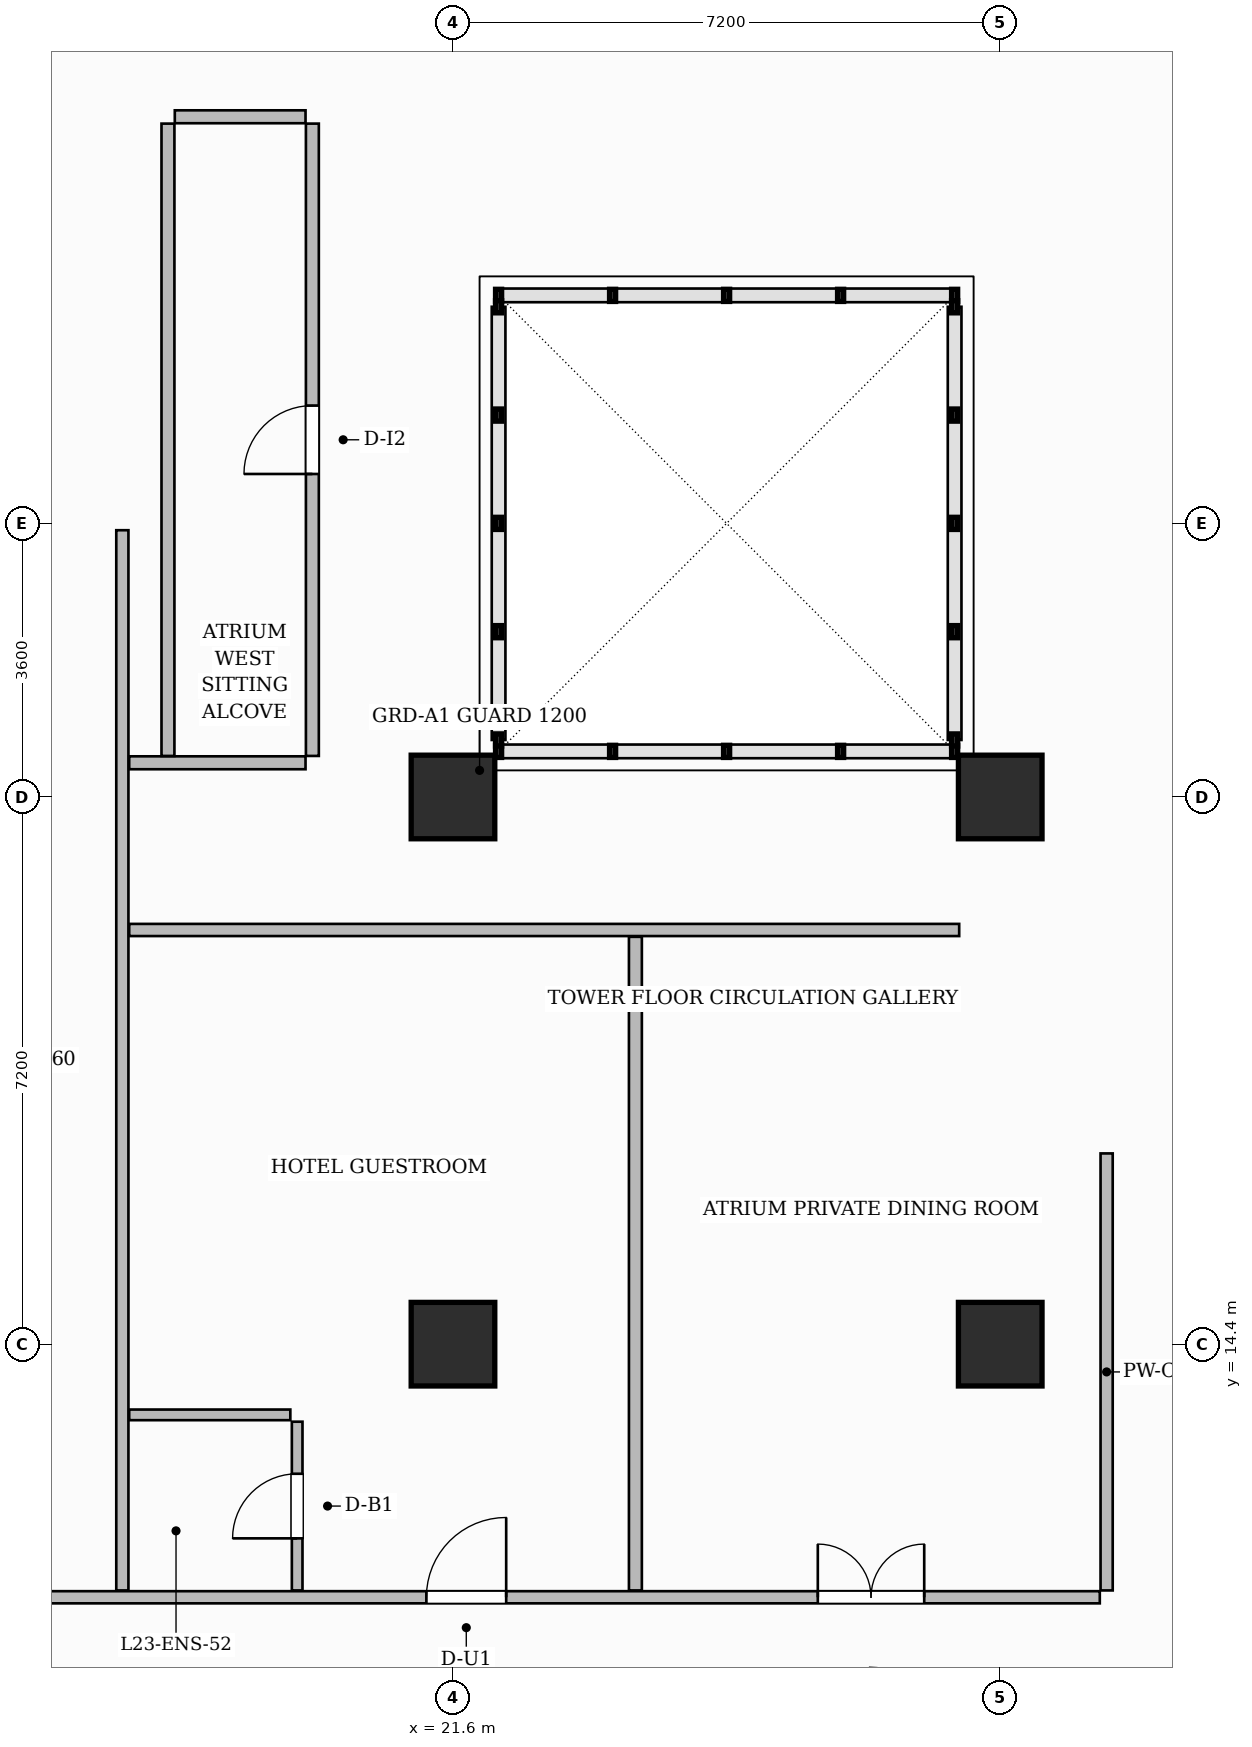
"""IFC4 building model, lengths in metres.
Left out: names, types, materials, properties, quantities, classifications, styles, units other than length and angle.
Written with IfcOpenShell. Run it as: python <this file> out.ifc"""

import sys

from ifc_helpers import new_model, si_unit, direction, frame, frame_2d, origin, origin_2d, place, context, subcontext, project, spatial, rectangle, extrude, source, transform, mapped, element, fill, save


model = new_model("IFC4")
c1 = context("Model", 3, precision=1e-05, world=origin(), true_north=direction((0.0, 1.0)))
c2 = subcontext(c1, "Body", "Model", "MODEL_VIEW")
j1 = project(units=[si_unit("LENGTHUNIT", "METRE"), si_unit("PLANEANGLEUNIT", "RADIAN")], contexts=[c1])
p1 = place(None, origin())
s1 = spatial("IfcSite", under=j1, at=p1, CompositionType="ELEMENT")
p2 = place(p1, origin())
s2 = spatial("IfcBuilding", under=s1, at=p2, CompositionType="ELEMENT")
p3 = place(p2, frame((0.0, 0.0, 95.3)))
s3 = spatial("IfcBuildingStorey", under=s2, at=p3, CompositionType="ELEMENT", Elevation=95.3)
m1 = source(origin(), c2, "Body", "SweptSolid", [
    extrude(rectangle(XDim=1.1, YDim=1.1, at=origin_2d()), origin(), (0.0, 0.0, 1.0), 3.7),
])
for number, where, z_axis, x_axis in (
    (1, (21.6, 14.4, 0.0), (0.0, 0.0, 1.0), (1.0, 0.0, 0.0)),
    (2, (21.6, 21.6, 0.0), (0.0, 0.0, 1.0), (1.0, 0.0, 0.0)),
    (3, (28.8, 14.4, 0.0), (0.0, 0.0, 1.0), (1.0, 0.0, 0.0)),
    (4, (28.8, 21.6, 0.0), (0.0, 0.0, 1.0), (1.0, 0.0, 0.0)),
):
    element("IfcColumn", number, at=place(p3, frame(where, z_axis=z_axis, x_axis=x_axis)), inside=s3, PredefinedType="COLUMN", context=c2, shape_type="MappedRepresentation", body=[
        mapped(m1, transform((0.0, 0.0, 0.0), scale=1.0)),
    ])
p4 = place(p3, frame((14.548, 11.07, 0.0), z_axis=(0.0, 0.0, 1.0), x_axis=(1.0, 0.0, 0.0)))
e5 = element("IfcWall", 5, at=p4, inside=s3, PredefinedType="PARTITIONING", context=c2, shape_type="SweptSolid", body=[
    extrude(rectangle(XDim=15.562, YDim=0.16, at=frame_2d((7.781, 0.0))), origin(), (0.0, 0.0, 1.0), 3.45),
])
p5 = place(p4, frame((6.702, 0.0, 0.0)))
e6 = element("IfcOpeningElement", 6, at=p5, cuts=e5, PredefinedType="OPENING", context=c2, shape_type="SweptSolid", body=[
    extrude(rectangle(XDim=1.05, YDim=2.25, at=frame_2d((0.525, 1.125))), frame((0.0, 0.09, 0.0), z_axis=(0.0, -1.0, 0.0), x_axis=(1.0, 0.0, 0.0)), (0.0, 0.0, 1.0), 0.18),
])
p6 = place(p4, frame((11.852, 0.0, 0.0)))
e7 = element("IfcOpeningElement", 7, at=p6, cuts=e5, PredefinedType="OPENING", context=c2, shape_type="SweptSolid", body=[
    extrude(rectangle(XDim=1.4, YDim=2.35, at=frame_2d((0.7, 1.175))), frame((0.0, 0.09, 0.0), z_axis=(0.0, -1.0, 0.0), x_axis=(1.0, 0.0, 0.0)), (0.0, 0.0, 1.0), 0.18),
])
p7 = place(p3, frame((30.2, 11.16, 0.0), z_axis=(0.0, 0.0, 1.0), x_axis=(0.0, 1.0, 0.0)))
e8 = element("IfcWall", 8, at=p7, inside=s3, PredefinedType="PARTITIONING", context=c2, shape_type="SweptSolid", body=[
    extrude(rectangle(XDim=5.75, YDim=0.16, at=frame_2d((2.875, 0.0))), origin(), (0.0, 0.0, 1.0), 3.45),
])
p8 = place(p3, frame((17.25, 11.16, 0.0), z_axis=(0.0, 0.0, 1.0), x_axis=(0.0, 1.0, 0.0)))
e9 = element("IfcWall", 9, at=p8, inside=s3, PredefinedType="PARTITIONING", context=c2, shape_type="SweptSolid", body=[
    extrude(rectangle(XDim=13.95, YDim=0.16, at=frame_2d((6.975, 0.0))), origin(), (0.0, 0.0, 1.0), 3.45),
])
p9 = place(p3, frame((17.34, 22.05, 0.0), z_axis=(0.0, 0.0, 1.0), x_axis=(1.0, 0.0, 0.0)))
e10 = element("IfcWall", 10, at=p9, inside=s3, PredefinedType="PARTITIONING", context=c2, shape_type="SweptSolid", body=[
    extrude(rectangle(XDim=2.32, YDim=0.17, at=frame_2d((1.16, 0.0))), origin(), (0.0, 0.0, 1.0), 3.45),
])
p10 = place(p3, frame((17.94, 30.55, 0.0), z_axis=(0.0, 0.0, 1.0), x_axis=(1.0, 0.0, 0.0)))
e11 = element("IfcWall", 11, at=p10, inside=s3, PredefinedType="PARTITIONING", context=c2, shape_type="SweptSolid", body=[
    extrude(rectangle(XDim=1.72, YDim=0.17, at=frame_2d((0.86, 0.0))), origin(), (0.0, 0.0, 1.0), 3.45),
])
p11 = place(p3, frame((17.85, 22.14, 0.0), z_axis=(0.0, 0.0, 1.0), x_axis=(0.0, 1.0, 0.0)))
e12 = element("IfcWall", 12, at=p11, inside=s3, PredefinedType="PARTITIONING", context=c2, shape_type="SweptSolid", body=[
    extrude(rectangle(XDim=8.32, YDim=0.17, at=frame_2d((4.16, 0.0))), origin(), (0.0, 0.0, 1.0), 3.45),
])
p12 = place(p3, frame((19.75, 22.14, 0.0), z_axis=(0.0, 0.0, 1.0), x_axis=(0.0, 1.0, 0.0)))
e13 = element("IfcWall", 13, at=p12, inside=s3, PredefinedType="PARTITIONING", context=c2, shape_type="SweptSolid", body=[
    extrude(rectangle(XDim=8.32, YDim=0.17, at=frame_2d((4.16, 0.0))), origin(), (0.0, 0.0, 1.0), 3.45),
])
p13 = place(p12, frame((3.71, 0.0, 0.0)))
e14 = element("IfcOpeningElement", 14, at=p13, cuts=e13, PredefinedType="OPENING", context=c2, shape_type="SweptSolid", body=[
    extrude(rectangle(XDim=0.9, YDim=2.15, at=frame_2d((0.45, 1.075))), frame((0.0, 0.095, 0.0), z_axis=(0.0, -1.0, 0.0), x_axis=(1.0, 0.0, 0.0)), (0.0, 0.0, 1.0), 0.19),
])
p14 = place(p3, frame((17.34, 19.85, 0.0), z_axis=(0.0, 0.0, 1.0), x_axis=(1.0, 0.0, 0.0)))
e15 = element("IfcWall", 15, at=p14, inside=s3, PredefinedType="PARTITIONING", context=c2, shape_type="SweptSolid", body=[
    extrude(rectangle(XDim=10.92, YDim=0.16, at=frame_2d((5.46, 0.0))), origin(), (0.0, 0.0, 1.0), 3.45),
])
p15 = place(p3, frame((24.0, 11.16, 0.0), z_axis=(0.0, 0.0, 1.0), x_axis=(0.0, 1.0, 0.0)))
e16 = element("IfcWall", 16, at=p15, inside=s3, PredefinedType="PARTITIONING", context=c2, shape_type="SweptSolid", body=[
    extrude(rectangle(XDim=8.6, YDim=0.17, at=frame_2d((4.3, 0.0))), origin(), (0.0, 0.0, 1.0), 3.45),
])
p16 = place(p3, frame((19.55, 11.16, 0.0), z_axis=(0.0, 0.0, 1.0), x_axis=(0.0, 1.0, 0.0)))
e17 = element("IfcWall", 17, at=p16, inside=s3, PredefinedType="PARTITIONING", context=c2, shape_type="SweptSolid", body=[
    extrude(rectangle(XDim=2.22, YDim=0.14, at=frame_2d((1.11, 0.0))), origin(), (0.0, 0.0, 1.0), 3.45),
])
p17 = place(p16, frame((0.685, 0.0, 0.0)))
e18 = element("IfcOpeningElement", 18, at=p17, cuts=e17, PredefinedType="OPENING", context=c2, shape_type="SweptSolid", body=[
    extrude(rectangle(XDim=0.85, YDim=2.1, at=frame_2d((0.425, 1.05))), frame((0.0, 0.08, 0.0), z_axis=(0.0, -1.0, 0.0), x_axis=(1.0, 0.0, 0.0)), (0.0, 0.0, 1.0), 0.16),
])
p18 = place(p3, frame((17.34, 13.47, 0.0), z_axis=(0.0, 0.0, 1.0), x_axis=(1.0, 0.0, 0.0)))
e19 = element("IfcWall", 19, at=p18, inside=s3, PredefinedType="PARTITIONING", context=c2, shape_type="SweptSolid", body=[
    extrude(rectangle(XDim=2.12, YDim=0.14, at=frame_2d((1.06, 0.0))), origin(), (0.0, 0.0, 1.0), 3.45),
])
m2 = source(origin(), c2, "Body", "SweptSolid", [
    extrude(rectangle(XDim=0.9, YDim=2.15, at=frame_2d((0.45, 1.075))), frame((0.0, 0.025, 0.0), z_axis=(0.0, -1.0, 0.0), x_axis=(1.0, 0.0, 0.0)), (0.0, 0.0, 1.0), 0.05),
])
p19 = place(p13, origin())
e20 = element("IfcDoor", 20, at=p19, inside=s3, OperationType="SINGLE_SWING_LEFT", PredefinedType="DOOR", context=c2, shape_type="MappedRepresentation", body=[
    mapped(m2, transform((0.0, 0.0, 0.0), scale=1.0)),
])
fill(e14, e20)
m3 = source(origin(), c2, "Body", "SweptSolid", [
    extrude(rectangle(XDim=0.85, YDim=2.1, at=frame_2d((0.425, 1.05))), frame((0.0, 0.025, 0.0), z_axis=(0.0, -1.0, 0.0), x_axis=(1.0, 0.0, 0.0)), (0.0, 0.0, 1.0), 0.05),
])
p20 = place(p17, origin())
e21 = element("IfcDoor", 21, at=p20, inside=s3, OperationType="SINGLE_SWING_LEFT", PredefinedType="DOOR", context=c2, shape_type="MappedRepresentation", body=[
    mapped(m3, transform((0.0, 0.0, 0.0), scale=1.0)),
])
fill(e18, e21)
m4 = source(origin(), c2, "Body", "SweptSolid", [
    extrude(rectangle(XDim=1.05, YDim=2.25, at=frame_2d((0.525, 1.125))), frame((0.0, 0.025, 0.0), z_axis=(0.0, -1.0, 0.0), x_axis=(1.0, 0.0, 0.0)), (0.0, 0.0, 1.0), 0.05),
])
p21 = place(p5, origin())
e22 = element("IfcDoor", 22, at=p21, inside=s3, OperationType="SINGLE_SWING_RIGHT", PredefinedType="DOOR", context=c2, shape_type="MappedRepresentation", body=[
    mapped(m4, transform((0.0, 0.0, 0.0), scale=1.0)),
])
fill(e6, e22)
m5 = source(origin(), c2, "Body", "SweptSolid", [
    extrude(rectangle(XDim=1.4, YDim=2.35, at=frame_2d((0.7, 1.175))), frame((0.0, 0.025, 0.0), z_axis=(0.0, -1.0, 0.0), x_axis=(1.0, 0.0, 0.0)), (0.0, 0.0, 1.0), 0.05),
])
p22 = place(p6, origin())
e23 = element("IfcDoor", 23, at=p22, inside=s3, OperationType="DOUBLE_DOOR_SINGLE_SWING", PredefinedType="DOOR", context=c2, shape_type="MappedRepresentation", body=[
    mapped(m5, transform((0.0, 0.0, 0.0), scale=1.0)),
])
fill(e7, e23)
save(model, sys.argv[1])
